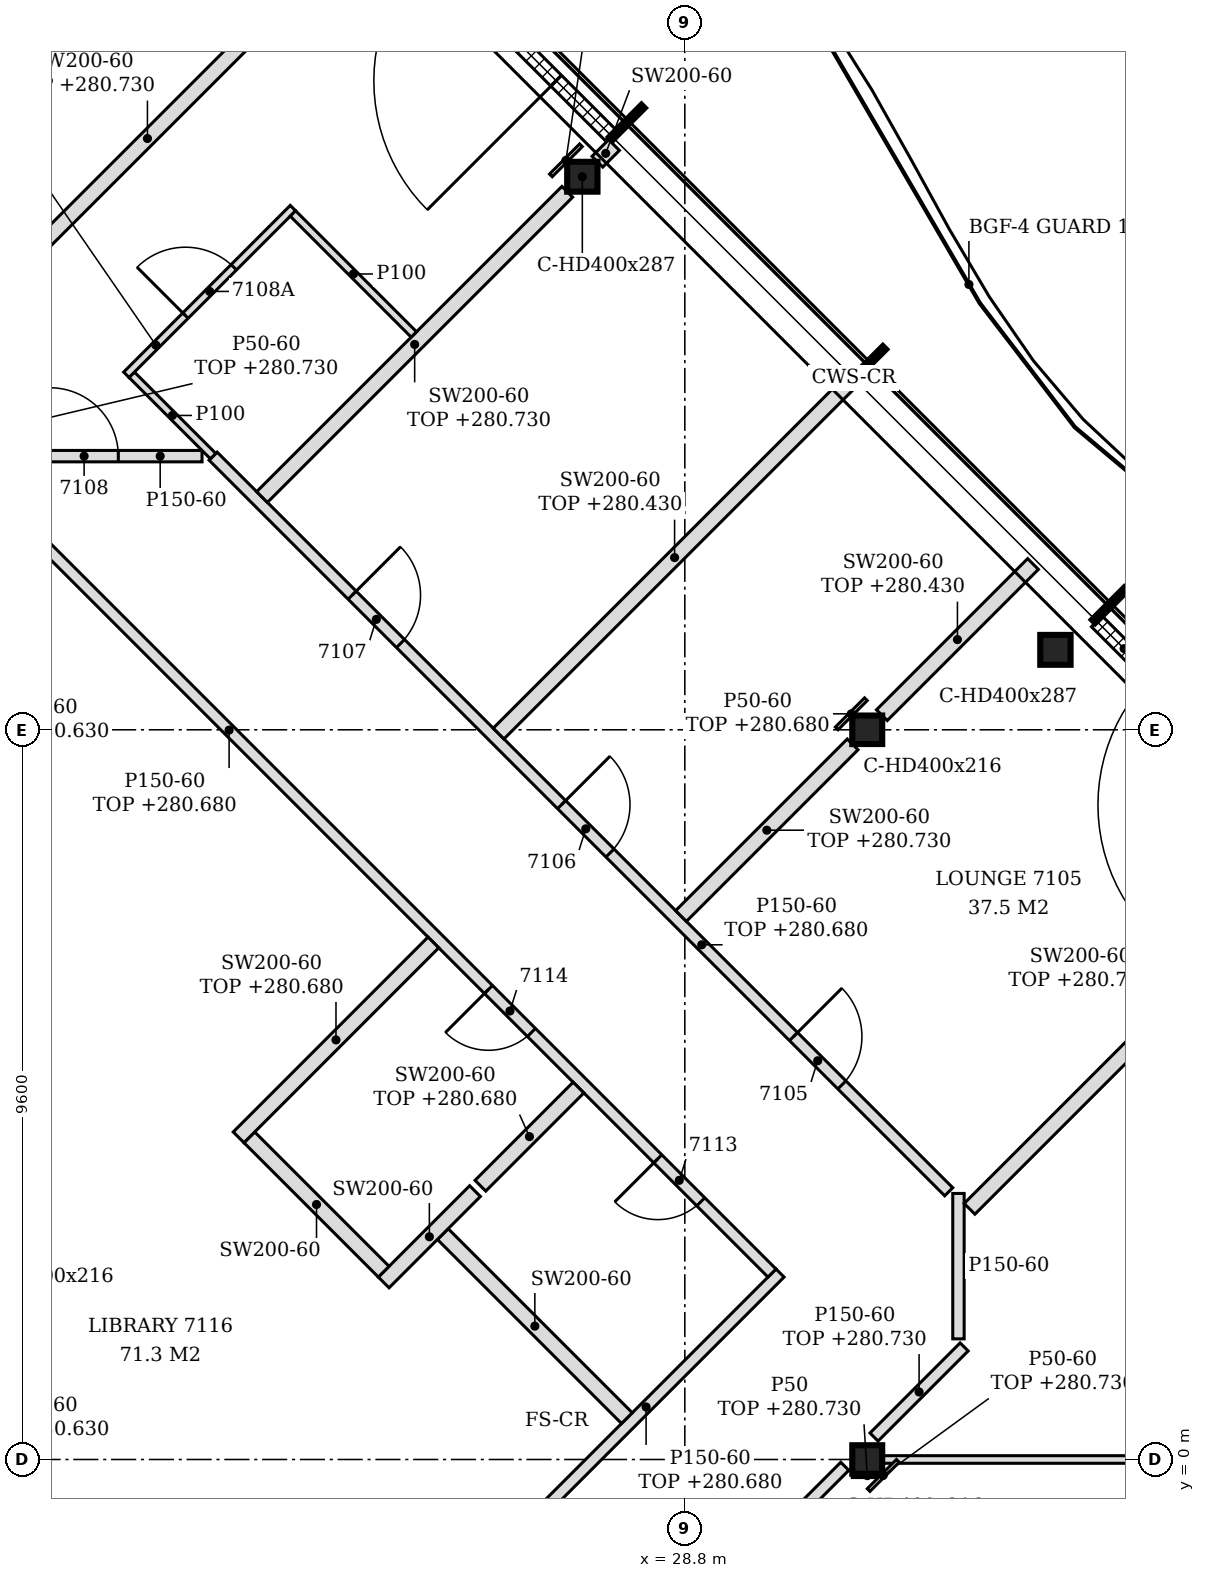
"""IFC4 building model, lengths in metres.
Left out: names, types, materials, properties, quantities, classifications, styles, units other than length and angle.
Written with IfcOpenShell. Run it as: python <this file> out.ifc"""

import sys

from ifc_helpers import new_model, si_unit, direction, frame, frame_2d, origin, origin_2d, place, context, subcontext, project, spatial, polyline, rectangle, i_section, outline, extrude, element, fill, save


model = new_model("IFC4")
c1 = context("Model", 3, precision=1e-05, world=origin(), true_north=direction((0.0, 1.0)))
c2 = subcontext(c1, "Body", "Model", "MODEL_VIEW")
j1 = project(units=[si_unit("LENGTHUNIT", "METRE"), si_unit("PLANEANGLEUNIT", "RADIAN")], contexts=[c1])
p1 = place(None, origin())
s1 = spatial("IfcSite", under=j1, at=p1, CompositionType="ELEMENT")
p2 = place(p1, origin())
s2 = spatial("IfcBuilding", under=s1, at=p2, CompositionType="ELEMENT")
p3 = place(p2, frame((0.0, 0.0, 277.8)))
s3 = spatial("IfcBuildingStorey", under=s2, at=p3, CompositionType="ELEMENT", Elevation=277.8)
for number, where, z_axis, x_axis in (
    (1, (33.676, 10.652, -0.15), (0.0, 0.0, 1.0), (1.0, 0.0, 0.0)),
    (2, (27.451, 16.876, -0.15), (0.0, 0.0, 1.0), (1.0, 0.0, 0.0)),
):
    element("IfcColumn", number, at=place(p3, frame(where, z_axis=z_axis, x_axis=x_axis)), inside=s3, PredefinedType="COLUMN", context=c2, shape_type="SweptSolid", body=[
        extrude(i_section(OverallWidth=0.399, OverallDepth=0.393, WebThickness=0.023, FlangeThickness=0.037, FilletRadius=0.015, at=origin_2d()), origin(), (0.0, 0.0, 1.0), 3.6),
    ])
for number, where, z_axis, x_axis in (
    (3, (31.2, 0.0, -0.15), (0.0, 0.0, 1.0), (1.0, 0.0, 0.0)),
    (4, (31.2, 9.6, -0.15), (0.0, 0.0, 1.0), (1.0, 0.0, 0.0)),
):
    element("IfcColumn", number, at=place(p3, frame(where, z_axis=z_axis, x_axis=x_axis)), inside=s3, PredefinedType="COLUMN", context=c2, shape_type="SweptSolid", body=[
        extrude(i_section(OverallWidth=0.394, OverallDepth=0.375, WebThickness=0.017, FlangeThickness=0.028, FilletRadius=0.015, at=origin_2d()), origin(), (0.0, 0.0, 1.0), 3.6),
    ])
p4 = place(p3, frame((37.353, 7.893, 0.0), z_axis=(0.0, 0.0, 1.0), x_axis=(-0.707134329907, 0.707079231393, 0.0)))
e5 = element("IfcWall", 5, at=p4, inside=s3, PredefinedType="NOTDEFINED", context=c2, shape_type="SweptSolid", body=[
    extrude(rectangle(XDim=4.431, YDim=0.2, at=frame_2d((2.215, 0.0))), origin(), (0.0, 0.0, 1.0), 3.45),
])
p5 = place(p4, frame((1.015, 0.0, 0.0)))
e6 = element("IfcOpeningElement", 6, at=p5, cuts=e5, PredefinedType="OPENING", context=c2, shape_type="SweptSolid", body=[
    extrude(rectangle(XDim=2.4, YDim=2.4, at=frame_2d((1.2, 1.2))), frame((0.0, 0.11, 0.0), z_axis=(0.0, -1.0, 0.0), x_axis=(1.0, 0.0, 0.0)), (0.0, 0.0, 1.0), 0.22),
])
p6 = place(p3, frame((27.826, 17.42, 0.0), z_axis=(0.0, 0.0, 1.0), x_axis=(-0.707079231393, 0.707134329907, 0.0)))
e7 = element("IfcWall", 7, at=p6, inside=s3, PredefinedType="NOTDEFINED", context=c2, shape_type="SweptSolid", body=[
    extrude(rectangle(XDim=4.431, YDim=0.2, at=frame_2d((2.215, 0.0))), origin(), (0.0, 0.0, 1.0), 3.45),
])
p7 = place(p6, frame((1.015, 0.0, 0.0)))
e8 = element("IfcOpeningElement", 8, at=p7, cuts=e7, PredefinedType="OPENING", context=c2, shape_type="SweptSolid", body=[
    extrude(rectangle(XDim=2.4, YDim=2.4, at=frame_2d((1.2, 1.2))), frame((0.0, 0.11, 0.0), z_axis=(0.0, -1.0, 0.0), x_axis=(1.0, 0.0, 0.0)), (0.0, 0.0, 1.0), 0.22),
])
p8 = place(p3, frame((13.122, -17.872, 0.0), z_axis=(0.0, 0.0, 1.0), x_axis=(0.707101927234, 0.707111635106, 0.0)))
e9 = element("IfcWall", 9, at=p8, inside=s3, PredefinedType="PARTITIONING", context=c2, shape_type="SweptSolid", body=[
    extrude(rectangle(XDim=25.149, YDim=0.15, at=frame_2d((12.574, 0.0))), origin(), (0.0, 0.0, 1.0), 2.73),
])
p9 = place(p8, frame((4.672, 0.0, 0.0)))
e10 = element("IfcOpeningElement", 10, at=p9, cuts=e9, PredefinedType="OPENING", context=c2, shape_type="SweptSolid", body=[
    extrude(rectangle(XDim=0.9, YDim=2.1, at=frame_2d((0.45, 1.05))), frame((0.0, 0.085, 0.0), z_axis=(0.0, -1.0, 0.0), x_axis=(1.0, 0.0, 0.0)), (0.0, 0.0, 1.0), 0.17),
])
p10 = place(p8, frame((14.284, 0.0, 0.0)))
e11 = element("IfcOpeningElement", 11, at=p10, cuts=e9, PredefinedType="OPENING", context=c2, shape_type="SweptSolid", body=[
    extrude(rectangle(XDim=0.9, YDim=2.1, at=frame_2d((0.45, 1.05))), frame((0.0, 0.085, 0.0), z_axis=(0.0, -1.0, 0.0), x_axis=(1.0, 0.0, 0.0)), (0.0, 0.0, 1.0), 0.17),
])
p11 = place(p8, frame((22.704, 0.0, 0.0)))
e12 = element("IfcOpeningElement", 12, at=p11, cuts=e9, PredefinedType="OPENING", context=c2, shape_type="SweptSolid", body=[
    extrude(rectangle(XDim=0.9, YDim=2.1, at=frame_2d((0.45, 1.05))), frame((0.0, 0.085, 0.0), z_axis=(0.0, -1.0, 0.0), x_axis=(1.0, 0.0, 0.0)), (0.0, 0.0, 1.0), 0.17),
])
p12 = place(p3, frame((26.528, -1.072, 0.0), z_axis=(0.0, 0.0, 1.0), x_axis=(0.707106781187, 0.707106781187, 0.0)))
e13 = element("IfcWall", 13, at=p12, inside=s3, PredefinedType="PARTITIONING", context=c2, shape_type="SweptSolid", body=[
    extrude(rectangle(XDim=4.985, YDim=0.15, at=frame_2d((2.492, 0.0))), origin(), (0.0, 0.0, 1.0), 2.88),
])
p13 = place(p3, frame((31.397, 0.0, 0.0), z_axis=(0.0, 0.0, 1.0), x_axis=(1.0, 0.0, 0.0)))
e14 = element("IfcWall", 14, at=p13, inside=s3, PredefinedType="PARTITIONING", context=c2, shape_type="SweptSolid", body=[
    extrude(outline(polyline([(0.0, 0.0), (9.053, 0.0), (9.053, 2.98), (8.653, 2.98), (8.651, 2.93), (8.353, 2.93), (8.351, 2.98), (0.0, 2.98), (0.0, 0.0)])), frame((0.0, 0.05, 0.0), z_axis=(0.0, -1.0, 0.0), x_axis=(1.0, 0.0, 0.0)), (0.0, 0.0, 1.0), 0.1),
])
p14 = place(p13, frame((4.05, 0.0, 0.0)))
e15 = element("IfcOpeningElement", 15, at=p14, cuts=e14, PredefinedType="OPENING", context=c2, shape_type="SweptSolid", body=[
    extrude(rectangle(XDim=0.9, YDim=2.1, at=frame_2d((0.45, 1.05))), frame((0.0, 0.06, 0.0), z_axis=(0.0, -1.0, 0.0), x_axis=(1.0, 0.0, 0.0)), (0.0, 0.0, 1.0), 0.12),
])
p15 = place(p3, frame((31.289, 0.295, 0.0), z_axis=(0.0, 0.0, 1.0), x_axis=(0.707106781187, 0.707106781187, 0.0)))
e16 = element("IfcWall", 16, at=p15, inside=s3, PredefinedType="PARTITIONING", context=c2, shape_type="SweptSolid", body=[
    extrude(rectangle(XDim=1.677, YDim=0.15, at=frame_2d((0.838, 0.0))), origin(), (0.0, 0.0, 1.0), 2.93),
])
p16 = place(p3, frame((28.038, 0.544, 0.0), z_axis=(0.0, 0.0, 1.0), x_axis=(-0.707213699878, 0.706999846325, 0.0)))
e17 = element("IfcWall", 17, at=p16, inside=s3, PredefinedType="PARTITIONING", context=c2, shape_type="SweptSolid", body=[
    extrude(rectangle(XDim=3.425, YDim=0.2, at=frame_2d((1.712, 0.0))), origin(), (0.0, 0.0, 1.0), 3.45),
])
p17 = place(p3, frame((32.4, 1.587, 0.0), z_axis=(0.0, 0.0, 1.0), x_axis=(0.0, 1.0, 0.0)))
e18 = element("IfcWall", 18, at=p17, inside=s3, PredefinedType="PARTITIONING", context=c2, shape_type="SweptSolid", body=[
    extrude(rectangle(XDim=1.913, YDim=0.15, at=frame_2d((0.957, 0.0))), origin(), (0.0, 0.0, 1.0), 3.45),
])
p18 = place(p3, frame((24.838, 2.329, 0.0), z_axis=(0.0, 0.0, 1.0), x_axis=(0.707034938994, 0.70717861608, 0.0)))
e19 = element("IfcWall", 19, at=p18, inside=s3, PredefinedType="PARTITIONING", context=c2, shape_type="SweptSolid", body=[
    extrude(rectangle(XDim=1.699, YDim=0.2, at=frame_2d((0.85, 0.0))), origin(), (0.0, 0.0, 1.0), 3.45),
])
p19 = place(p3, frame((24.838, 2.471, 0.0), z_axis=(0.0, 0.0, 1.0), x_axis=(-0.707106781187, 0.707106781187, 0.0)))
e20 = element("IfcWall", 20, at=p19, inside=s3, PredefinedType="PARTITIONING", context=c2, shape_type="SweptSolid", body=[
    extrude(rectangle(XDim=2.5, YDim=0.2, at=frame_2d((1.25, 0.0))), origin(), (0.0, 0.0, 1.0), 3.45),
])
p20 = place(p3, frame((29.947, 2.453, 0.0), z_axis=(0.0, 0.0, 1.0), x_axis=(-0.707098603185, 0.707114959093, 0.0)))
e21 = element("IfcWall", 21, at=p20, inside=s3, PredefinedType="PARTITIONING", context=c2, shape_type="SweptSolid", body=[
    extrude(rectangle(XDim=14.927, YDim=0.15, at=frame_2d((7.463, 0.0))), origin(), (0.0, 0.0, 1.0), 2.88),
])
p21 = place(p20, frame((1.325, 0.0, 0.0)))
e22 = element("IfcOpeningElement", 22, at=p21, cuts=e21, PredefinedType="OPENING", context=c2, shape_type="SweptSolid", body=[
    extrude(rectangle(XDim=0.8, YDim=2.1, at=frame_2d((0.4, 1.05))), frame((0.0, 0.085, 0.0), z_axis=(0.0, -1.0, 0.0), x_axis=(1.0, 0.0, 0.0)), (0.0, 0.0, 1.0), 0.17),
])
p22 = place(p20, frame((4.476, 0.0, 0.0)))
e23 = element("IfcOpeningElement", 23, at=p22, cuts=e21, PredefinedType="OPENING", context=c2, shape_type="SweptSolid", body=[
    extrude(rectangle(XDim=0.8, YDim=2.1, at=frame_2d((0.4, 1.05))), frame((0.0, 0.085, 0.0), z_axis=(0.0, -1.0, 0.0), x_axis=(1.0, 0.0, 0.0)), (0.0, 0.0, 1.0), 0.17),
])
p23 = place(p3, frame((32.546, 3.298, 0.0), z_axis=(0.0, 0.0, 1.0), x_axis=(0.707106781187, 0.707106781187, 0.0)))
e24 = element("IfcWall", 24, at=p23, inside=s3, PredefinedType="PARTITIONING", context=c2, shape_type="SweptSolid", body=[
    extrude(rectangle(XDim=6.519, YDim=0.2, at=frame_2d((3.26, 0.0))), origin(), (0.0, 0.0, 1.0), 2.93),
])
p24 = place(p3, frame((32.272, 3.522, 0.0), z_axis=(0.0, 0.0, 1.0), x_axis=(-0.707106781187, 0.707106781187, 0.0)))
e25 = element("IfcWall", 25, at=p24, inside=s3, PredefinedType="PARTITIONING", context=c2, shape_type="SweptSolid", body=[
    extrude(rectangle(XDim=13.687, YDim=0.15, at=frame_2d((6.843, 0.0))), origin(), (0.0, 0.0, 1.0), 2.88),
])
p25 = place(p24, frame((1.988, 0.0, 0.0)))
e26 = element("IfcOpeningElement", 26, at=p25, cuts=e25, PredefinedType="OPENING", context=c2, shape_type="SweptSolid", body=[
    extrude(rectangle(XDim=0.9, YDim=2.1, at=frame_2d((0.45, 1.05))), frame((0.0, 0.085, 0.0), z_axis=(0.0, -1.0, 0.0), x_axis=(1.0, 0.0, 0.0)), (0.0, 0.0, 1.0), 0.17),
])
p26 = place(p24, frame((6.303, 0.0, 0.0)))
e27 = element("IfcOpeningElement", 27, at=p26, cuts=e25, PredefinedType="OPENING", context=c2, shape_type="SweptSolid", body=[
    extrude(rectangle(XDim=0.9, YDim=2.1, at=frame_2d((0.45, 1.05))), frame((0.0, 0.085, 0.0), z_axis=(0.0, -1.0, 0.0), x_axis=(1.0, 0.0, 0.0)), (0.0, 0.0, 1.0), 0.17),
])
p27 = place(p24, frame((10.2, 0.0, 0.0)))
e28 = element("IfcOpeningElement", 28, at=p27, cuts=e25, PredefinedType="OPENING", context=c2, shape_type="SweptSolid", body=[
    extrude(rectangle(XDim=0.9, YDim=2.1, at=frame_2d((0.45, 1.05))), frame((0.0, 0.085, 0.0), z_axis=(0.0, -1.0, 0.0), x_axis=(1.0, 0.0, 0.0)), (0.0, 0.0, 1.0), 0.17),
])
p28 = place(p3, frame((26.111, 3.602, 0.0), z_axis=(0.0, 0.0, 1.0), x_axis=(0.706906117117, 0.707307388328, 0.0)))
e29 = element("IfcWall", 29, at=p28, inside=s3, PredefinedType="PARTITIONING", context=c2, shape_type="SweptSolid", body=[
    extrude(rectangle(XDim=1.825, YDim=0.2, at=frame_2d((0.913, 0.0))), origin(), (0.0, 0.0, 1.0), 2.88),
])
p29 = place(p3, frame((22.929, 4.238, 0.0), z_axis=(0.0, 0.0, 1.0), x_axis=(0.706972068525, 0.707241468189, 0.0)))
e30 = element("IfcWall", 30, at=p29, inside=s3, PredefinedType="PARTITIONING", context=c2, shape_type="SweptSolid", body=[
    extrude(rectangle(XDim=3.625, YDim=0.2, at=frame_2d((1.812, 0.0))), origin(), (0.0, 0.0, 1.0), 2.88),
])
p30 = place(p3, frame((28.75, 7.15, 0.0), z_axis=(0.0, 0.0, 1.0), x_axis=(0.707106781187, 0.707106781187, 0.0)))
e31 = element("IfcWall", 31, at=p30, inside=s3, PredefinedType="PARTITIONING", context=c2, shape_type="SweptSolid", body=[
    extrude(rectangle(XDim=3.193, YDim=0.2, at=frame_2d((1.597, 0.0))), origin(), (0.0, 0.0, 1.0), 2.93),
])
p31 = place(p3, frame((26.35, 9.55, 0.0), z_axis=(0.0, 0.0, 1.0), x_axis=(0.707088140984, 0.707125420898, 0.0)))
e32 = element("IfcWall", 32, at=p31, inside=s3, PredefinedType="PARTITIONING", context=c2, shape_type="SweptSolid", body=[
    extrude(rectangle(XDim=6.549, YDim=0.2, at=frame_2d((3.274, 0.0))), origin(), (0.0, 0.0, 1.0), 2.63),
])
p32 = place(p3, frame((31.392, 9.792, 0.0), z_axis=(0.0, 0.0, 1.0), x_axis=(0.707106781187, 0.707106781187, 0.0)))
e33 = element("IfcWall", 33, at=p32, inside=s3, PredefinedType="PARTITIONING", context=c2, shape_type="SweptSolid", body=[
    extrude(rectangle(XDim=2.812, YDim=0.2, at=frame_2d((1.406, 0.0))), origin(), (0.0, 0.0, 1.0), 2.63),
])
p33 = place(p3, frame((23.238, 12.662, 0.0), z_axis=(0.0, 0.0, 1.0), x_axis=(0.707128276734, 0.707085284986, 0.0)))
e34 = element("IfcWall", 34, at=p33, inside=s3, PredefinedType="PARTITIONING", context=c2, shape_type="SweptSolid", body=[
    extrude(rectangle(XDim=5.679, YDim=0.2, at=frame_2d((2.839, 0.0))), origin(), (0.0, 0.0, 1.0), 2.93),
])
p34 = place(p3, frame((19.397, 13.2, 0.0), z_axis=(0.0, 0.0, 1.0), x_axis=(1.0, 0.0, 0.0)))
e35 = element("IfcWall", 35, at=p34, inside=s3, PredefinedType="PARTITIONING", context=c2, shape_type="SweptSolid", body=[
    extrude(rectangle(XDim=3.051, YDim=0.15, at=frame_2d((1.526, 0.0))), origin(), (0.0, 0.0, 1.0), 3.45),
])
p35 = place(p34, frame((1.05, 0.0, 0.0)))
e36 = element("IfcOpeningElement", 36, at=p35, cuts=e35, PredefinedType="OPENING", context=c2, shape_type="SweptSolid", body=[
    extrude(rectangle(XDim=0.9, YDim=2.1, at=frame_2d((0.45, 1.05))), frame((0.0, 0.085, 0.0), z_axis=(0.0, -1.0, 0.0), x_axis=(1.0, 0.0, 0.0)), (0.0, 0.0, 1.0), 0.17),
])
p36 = place(p3, frame((22.594, 13.2, 0.0), z_axis=(0.0, 0.0, 1.0), x_axis=(-0.707106781187, 0.707106781187, 0.0)))
e37 = element("IfcWall", 37, at=p36, inside=s3, PredefinedType="PARTITIONING", context=c2, shape_type="SweptSolid", body=[
    extrude(rectangle(XDim=1.514, YDim=0.1, at=frame_2d((0.757, 0.0))), origin(), (0.0, 0.0, 1.0), 3.45),
])
p37 = place(p3, frame((21.453, 14.271, 0.0), z_axis=(0.0, 0.0, 1.0), x_axis=(0.70690988682, 0.707303620743, 0.0)))
e38 = element("IfcWall", 38, at=p37, inside=s3, PredefinedType="PARTITIONING", context=c2, shape_type="SweptSolid", body=[
    extrude(rectangle(XDim=3.1, YDim=0.1, at=frame_2d((1.55, 0.0))), origin(), (0.0, 0.0, 1.0), 2.93),
])
p38 = place(p37, frame((1.1, 0.0, 0.0)))
e39 = element("IfcOpeningElement", 39, at=p38, cuts=e38, PredefinedType="OPENING", context=c2, shape_type="SweptSolid", body=[
    extrude(rectangle(XDim=0.9, YDim=2.1, at=frame_2d((0.45, 1.05))), frame((0.0, 0.06, 0.0), z_axis=(0.0, -1.0, 0.0), x_axis=(1.0, 0.0, 0.0)), (0.0, 0.0, 1.0), 0.12),
])
p39 = place(p3, frame((18.753, 14.402, 0.0), z_axis=(0.0, 0.0, 1.0), x_axis=(0.707179267043, 0.707034287899, 0.0)))
e40 = element("IfcWall", 40, at=p39, inside=s3, PredefinedType="PARTITIONING", context=c2, shape_type="SweptSolid", body=[
    extrude(rectangle(XDim=8.42, YDim=0.2, at=frame_2d((4.21, 0.0))), origin(), (0.0, 0.0, 1.0), 2.93),
])
p40 = place(p3, frame((25.235, 14.801, 0.0), z_axis=(0.0, 0.0, 1.0), x_axis=(-0.706944047094, 0.707269477836, 0.0)))
e41 = element("IfcWall", 41, at=p40, inside=s3, PredefinedType="PARTITIONING", context=c2, shape_type="SweptSolid", body=[
    extrude(rectangle(XDim=2.251, YDim=0.1, at=frame_2d((1.125, 0.0))), origin(), (0.0, 0.0, 1.0), 3.45),
])
p41 = place(p3, frame((27.65, 17.073, 0.0), z_axis=(0.0, 0.0, 1.0), x_axis=(0.707106781187, 0.707106781187, 0.0)))
e42 = element("IfcWall", 42, at=p41, inside=s3, PredefinedType="PARTITIONING", context=c2, shape_type="SweptSolid", body=[
    extrude(rectangle(XDim=0.31, YDim=0.2, at=frame_2d((0.155, 0.0))), origin(), (0.0, 0.0, 1.0), 3.45),
])
p42 = place(p3, frame((31.218, -0.402, 0.0), z_axis=(0.0, 0.0, 1.0), x_axis=(0.707106781187, 0.707106781187, 0.0)))
e43 = element("IfcWall", 43, at=p42, inside=s3, PredefinedType="PARTITIONING", context=c2, shape_type="SweptSolid", body=[
    extrude(rectangle(XDim=0.544, YDim=0.05, at=frame_2d((0.272, 0.0))), origin(), (0.0, 0.0, 1.0), 2.93),
])
p43 = place(p3, frame((31.003, -0.212, 0.0), z_axis=(0.0, 0.0, 1.0), x_axis=(1.0, 0.0, 0.0)))
e44 = element("IfcWall", 44, at=p43, inside=s3, PredefinedType="PARTITIONING", context=c2, shape_type="SweptSolid", body=[
    extrude(rectangle(XDim=0.394, YDim=0.05, at=frame_2d((0.197, 0.0))), origin(), (0.0, 0.0, 1.0), 2.93),
])
p44 = place(p3, frame((30.798, 9.618, 0.0), z_axis=(0.0, 0.0, 1.0), x_axis=(0.707106781187, 0.707106781187, 0.0)))
e45 = element("IfcWall", 45, at=p44, inside=s3, PredefinedType="PARTITIONING", context=c2, shape_type="SweptSolid", body=[
    extrude(rectangle(XDim=0.544, YDim=0.05, at=frame_2d((0.272, 0.0))), origin(), (0.0, 0.0, 1.0), 2.88),
])
p45 = place(p3, frame((27.038, 16.893, 0.0), z_axis=(0.0, 0.0, 1.0), x_axis=(0.707106781187, 0.707106781187, 0.0)))
e46 = element("IfcWall", 46, at=p45, inside=s3, PredefinedType="PARTITIONING", context=c2, shape_type="SweptSolid", body=[
    extrude(rectangle(XDim=0.56, YDim=0.05, at=frame_2d((0.28, 0.0))), origin(), (0.0, 0.0, 1.0), 2.93),
])
p46 = place(p7, origin())
e47 = element("IfcDoor", 47, at=p46, inside=s3, OperationType="SINGLE_SWING_LEFT", PredefinedType="DOOR", context=c2, shape_type="SweptSolid", body=[
    extrude(rectangle(XDim=2.4, YDim=2.4, at=frame_2d((1.2, 1.2))), frame((0.0, 0.025, 0.0), z_axis=(0.0, -1.0, 0.0), x_axis=(1.0, 0.0, 0.0)), (0.0, 0.0, 1.0), 0.05),
])
fill(e8, e47)
p47 = place(p25, frame((0.9, 0.0, 0.0), z_axis=(0.0, 0.0, 1.0), x_axis=(-1.0, 0.0, 0.0)))
e48 = element("IfcDoor", 48, at=p47, inside=s3, OperationType="SINGLE_SWING_LEFT", PredefinedType="DOOR", context=c2, shape_type="SweptSolid", body=[
    extrude(rectangle(XDim=0.9, YDim=2.1, at=frame_2d((0.45, 1.05))), frame((0.0, 0.025, 0.0), z_axis=(0.0, -1.0, 0.0), x_axis=(1.0, 0.0, 0.0)), (0.0, 0.0, 1.0), 0.05),
])
fill(e26, e48)
p48 = place(p26, frame((0.9, 0.0, 0.0), z_axis=(0.0, 0.0, 1.0), x_axis=(-1.0, 0.0, 0.0)))
e49 = element("IfcDoor", 49, at=p48, inside=s3, OperationType="SINGLE_SWING_LEFT", PredefinedType="DOOR", context=c2, shape_type="SweptSolid", body=[
    extrude(rectangle(XDim=0.9, YDim=2.1, at=frame_2d((0.45, 1.05))), frame((0.0, 0.025, 0.0), z_axis=(0.0, -1.0, 0.0), x_axis=(1.0, 0.0, 0.0)), (0.0, 0.0, 1.0), 0.05),
])
fill(e27, e49)
p49 = place(p27, frame((0.9, 0.0, 0.0), z_axis=(0.0, 0.0, 1.0), x_axis=(-1.0, 0.0, 0.0)))
e50 = element("IfcDoor", 50, at=p49, inside=s3, OperationType="SINGLE_SWING_LEFT", PredefinedType="DOOR", context=c2, shape_type="SweptSolid", body=[
    extrude(rectangle(XDim=0.9, YDim=2.1, at=frame_2d((0.45, 1.05))), frame((0.0, 0.025, 0.0), z_axis=(0.0, -1.0, 0.0), x_axis=(1.0, 0.0, 0.0)), (0.0, 0.0, 1.0), 0.05),
])
fill(e28, e50)
p50 = place(p35, origin())
e51 = element("IfcDoor", 51, at=p50, inside=s3, OperationType="SINGLE_SWING_LEFT", PredefinedType="DOOR", context=c2, shape_type="SweptSolid", body=[
    extrude(rectangle(XDim=0.9, YDim=2.1, at=frame_2d((0.45, 1.05))), frame((0.0, 0.025, 0.0), z_axis=(0.0, -1.0, 0.0), x_axis=(1.0, 0.0, 0.0)), (0.0, 0.0, 1.0), 0.05),
])
fill(e36, e51)
p51 = place(p38, origin())
e52 = element("IfcDoor", 52, at=p51, inside=s3, OperationType="SINGLE_SWING_LEFT", PredefinedType="DOOR", context=c2, shape_type="SweptSolid", body=[
    extrude(rectangle(XDim=0.9, YDim=2.1, at=frame_2d((0.45, 1.05))), frame((0.0, 0.025, 0.0), z_axis=(0.0, -1.0, 0.0), x_axis=(1.0, 0.0, 0.0)), (0.0, 0.0, 1.0), 0.05),
])
fill(e39, e52)
p52 = place(p21, origin())
e53 = element("IfcDoor", 53, at=p52, inside=s3, OperationType="SINGLE_SWING_RIGHT", PredefinedType="DOOR", context=c2, shape_type="SweptSolid", body=[
    extrude(rectangle(XDim=0.8, YDim=2.1, at=frame_2d((0.4, 1.05))), frame((0.0, 0.025, 0.0), z_axis=(0.0, -1.0, 0.0), x_axis=(1.0, 0.0, 0.0)), (0.0, 0.0, 1.0), 0.05),
])
fill(e22, e53)
p53 = place(p22, origin())
e54 = element("IfcDoor", 54, at=p53, inside=s3, OperationType="SINGLE_SWING_RIGHT", PredefinedType="DOOR", context=c2, shape_type="SweptSolid", body=[
    extrude(rectangle(XDim=0.8, YDim=2.1, at=frame_2d((0.4, 1.05))), frame((0.0, 0.025, 0.0), z_axis=(0.0, -1.0, 0.0), x_axis=(1.0, 0.0, 0.0)), (0.0, 0.0, 1.0), 0.05),
])
fill(e23, e54)
save(model, sys.argv[1])
